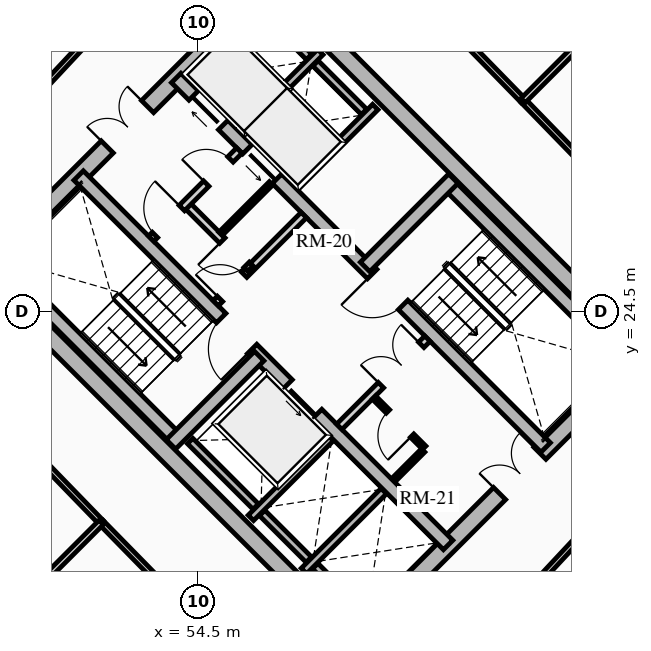
"""IFC4 building model, lengths in metres.
Left out: names, types, materials, properties, quantities, classifications, styles, units other than length and angle.
Written with IfcOpenShell. Run it as: python <this file> out.ifc"""

import sys

from ifc_helpers import new_model, si_unit, direction, frame, frame_2d, origin, place, context, subcontext, project, spatial, rectangle, extrude, source, transform, mapped, element, fill, save


model = new_model("IFC4")
c1 = context("Model", 3, precision=1e-05, world=origin(), true_north=direction((0.0, 1.0)))
c2 = subcontext(c1, "Body", "Model", "MODEL_VIEW")
j1 = project(units=[si_unit("LENGTHUNIT", "METRE"), si_unit("PLANEANGLEUNIT", "RADIAN")], contexts=[c1])
p1 = place(None, origin())
s1 = spatial("IfcSite", under=j1, at=p1, CompositionType="ELEMENT")
p2 = place(p1, origin())
s2 = spatial("IfcBuilding", under=s1, at=p2, CompositionType="ELEMENT")
p3 = place(p2, frame((0.0, 0.0, 93.43)))
s3 = spatial("IfcBuildingStorey", under=s2, at=p3, CompositionType="ELEMENT", Elevation=93.43)
for number, where, z_axis, x_axis in (
    (1, (58.737, 15.697, 0.0), (0.0, 0.0, 1.0), (-0.707, 0.707, 0.0)),
    (2, (66.303, 23.263, 0.0), (0.0, 0.0, 1.0), (-0.707, 0.707, 0.0)),
):
    element("IfcWall", number, at=place(p3, frame(where, z_axis=z_axis, x_axis=x_axis)), inside=s3, PredefinedType="SHEAR", context=c2, shape_type="SweptSolid", body=[
        extrude(rectangle(XDim=14.2, YDim=0.45, at=frame_2d((7.1, 0.0))), origin(), (0.0, 0.0, 1.0), 2.91),
    ])
p4 = place(p3, frame((58.578, 15.856, 0.0), z_axis=(0.0, 0.0, 1.0), x_axis=(0.707106781187, 0.707106781187, 0.0)))
e3 = element("IfcWall", 3, at=p4, inside=s3, PredefinedType="SHEAR", context=c2, shape_type="SweptSolid", body=[
    extrude(rectangle(XDim=10.7, YDim=0.45, at=frame_2d((5.35, 0.0))), origin(), (0.0, 0.0, 1.0), 2.91),
])
m1 = source(origin(), c2, "Body", "SweptSolid", [
    extrude(rectangle(XDim=1.5, YDim=2.02, at=frame_2d((0.75, 1.01))), frame((0.0, 0.235, 0.0), z_axis=(0.0, -1.0, 0.0), x_axis=(1.0, 0.0, 0.0)), (0.0, 0.0, 1.0), 0.47),
])
p5 = place(p4, frame((5.45, 0.0, 0.0)))
e4 = element("IfcOpeningElement", 4, at=p5, cuts=e3, PredefinedType="OPENING", context=c2, shape_type="MappedRepresentation", body=[
    mapped(m1, transform((0.0, 0.0, 0.0), x_axis=(1.0, 0.0, 0.0), y_axis=(0.0, 1.0, 0.0), z_axis=(0.0, 0.0, 1.0), scale=1.0)),
])
p6 = place(p3, frame((48.856, 25.578, 0.0), z_axis=(0.0, 0.0, 1.0), x_axis=(0.707106781187, 0.707106781187, 0.0)))
e5 = element("IfcWall", 5, at=p6, inside=s3, PredefinedType="SHEAR", context=c2, shape_type="SweptSolid", body=[
    extrude(rectangle(XDim=10.7, YDim=0.45, at=frame_2d((5.35, 0.0))), origin(), (0.0, 0.0, 1.0), 2.91),
])
p7 = place(p6, frame((4.6, 0.0, 0.0)))
e6 = element("IfcOpeningElement", 6, at=p7, cuts=e5, PredefinedType="OPENING", context=c2, shape_type="MappedRepresentation", body=[
    mapped(m1, transform((0.0, 0.0, 0.0), x_axis=(1.0, 0.0, 0.0), y_axis=(0.0, 1.0, 0.0), z_axis=(0.0, 0.0, 1.0), scale=1.0)),
])
p8 = place(p3, frame((61.078, 18.355, 0.0), z_axis=(0.0, 0.0, 1.0), x_axis=(-0.707106781187, 0.707106781187, 0.0)))
e7 = element("IfcWall", 7, at=p8, inside=s3, PredefinedType="SHEAR", context=c2, shape_type="SweptSolid", body=[
    extrude(rectangle(XDim=13.75, YDim=0.35, at=frame_2d((6.875, 0.0))), origin(), (0.0, 0.0, 1.0), 2.91),
])
m2 = source(origin(), c2, "Body", "SweptSolid", [
    extrude(rectangle(XDim=1.1, YDim=2.015, at=frame_2d((0.55, 1.007))), frame((0.0, 0.185, 0.0), z_axis=(0.0, -1.0, 0.0), x_axis=(1.0, 0.0, 0.0)), (0.0, 0.0, 1.0), 0.37),
])
p9 = place(p8, frame((4.875, 0.0, 0.0)))
e8 = element("IfcOpeningElement", 8, at=p9, cuts=e7, PredefinedType="OPENING", context=c2, shape_type="MappedRepresentation", body=[
    mapped(m2, transform((0.0, 0.0, 0.0), x_axis=(1.0, 0.0, 0.0), y_axis=(0.0, 1.0, 0.0), z_axis=(0.0, 0.0, 1.0), scale=1.0)),
])
m3 = source(origin(), c2, "Body", "SweptSolid", [
    extrude(rectangle(XDim=1.15, YDim=2.02, at=frame_2d((0.575, 1.01))), frame((0.0, 0.185, 0.0), z_axis=(0.0, -1.0, 0.0), x_axis=(1.0, 0.0, 0.0)), (0.0, 0.0, 1.0), 0.37),
])
p10 = place(p8, frame((7.295, 0.0, 0.0)))
e9 = element("IfcOpeningElement", 9, at=p10, cuts=e7, PredefinedType="OPENING", context=c2, shape_type="MappedRepresentation", body=[
    mapped(m3, transform((0.0, 0.0, 0.0), x_axis=(1.0, 0.0, 0.0), y_axis=(0.0, 1.0, 0.0), z_axis=(0.0, 0.0, 1.0), scale=1.0)),
])
p11 = place(p3, frame((63.645, 20.922, 0.0), z_axis=(0.0, 0.0, 1.0), x_axis=(-0.707106781187, 0.707106781187, 0.0)))
e10 = element("IfcWall", 10, at=p11, inside=s3, PredefinedType="SHEAR", context=c2, shape_type="SweptSolid", body=[
    extrude(rectangle(XDim=13.75, YDim=0.35, at=frame_2d((6.875, 0.0))), origin(), (0.0, 0.0, 1.0), 2.91),
])
p12 = place(p11, frame((10.0, 0.0, 0.0)))
e11 = element("IfcOpeningElement", 11, at=p12, cuts=e10, PredefinedType="OPENING", context=c2, shape_type="MappedRepresentation", body=[
    mapped(m2, transform((0.0, 0.0, 0.0), x_axis=(1.0, 0.0, 0.0), y_axis=(0.0, 1.0, 0.0), z_axis=(0.0, 0.0, 1.0), scale=1.0)),
])
p13 = place(p11, frame((12.0, 0.0, 0.0)))
e12 = element("IfcOpeningElement", 12, at=p13, cuts=e10, PredefinedType="OPENING", context=c2, shape_type="MappedRepresentation", body=[
    mapped(m2, transform((0.0, 0.0, 0.0), x_axis=(1.0, 0.0, 0.0), y_axis=(0.0, 1.0, 0.0), z_axis=(0.0, 0.0, 1.0), scale=1.0)),
])
p14 = place(p11, frame((5.305, 0.0, 0.0)))
e13 = element("IfcOpeningElement", 13, at=p14, cuts=e10, PredefinedType="OPENING", context=c2, shape_type="MappedRepresentation", body=[
    mapped(m3, transform((0.0, 0.0, 0.0), x_axis=(1.0, 0.0, 0.0), y_axis=(0.0, 1.0, 0.0), z_axis=(0.0, 0.0, 1.0), scale=1.0)),
])
p15 = place(p3, frame((53.922, 21.141, 0.0), z_axis=(0.0, 0.0, 1.0), x_axis=(-0.707088616009, 0.707124945897, 0.0)))
e14 = element("IfcWall", 14, at=p15, inside=s3, PredefinedType="SHEAR", context=c2, shape_type="SweptSolid", body=[
    extrude(rectangle(XDim=6.72, YDim=0.35, at=frame_2d((3.36, 0.0))), origin(), (0.0, 0.0, 1.0), 2.91),
])
p16 = place(p3, frame((53.784, 21.003, 0.0), z_axis=(0.0, 0.0, 1.0), x_axis=(0.707106781187, 0.707106781187, 0.0)))
e15 = element("IfcWall", 15, at=p16, inside=s3, PredefinedType="SHEAR", context=c2, shape_type="SweptSolid", body=[
    extrude(rectangle(XDim=3.285, YDim=0.35, at=frame_2d((1.643, 0.0))), origin(), (0.0, 0.0, 1.0), 2.91),
])
p17 = place(p3, frame((65.83, 23.107, 0.0), z_axis=(0.0, 0.0, 1.0), x_axis=(-0.707088616009, 0.707124945897, 0.0)))
e16 = element("IfcWall", 16, at=p17, inside=s3, PredefinedType="SHEAR", context=c2, shape_type="SweptSolid", body=[
    extrude(rectangle(XDim=6.72, YDim=0.35, at=frame_2d((3.36, 0.0))), origin(), (0.0, 0.0, 1.0), 2.91),
])
p18 = place(p3, frame((58.893, 25.674, 0.0), z_axis=(0.0, 0.0, 1.0), x_axis=(0.707106781187, 0.707106781187, 0.0)))
e17 = element("IfcWall", 17, at=p18, inside=s3, PredefinedType="SHEAR", context=c2, shape_type="SweptSolid", body=[
    extrude(rectangle(XDim=3.285, YDim=0.35, at=frame_2d((1.643, 0.0))), origin(), (0.0, 0.0, 1.0), 2.91),
])
p19 = place(p3, frame((55.888, 19.069, 0.0), z_axis=(0.0, 0.0, 1.0), x_axis=(0.707106781187, 0.707106781187, 0.0)))
e18 = element("IfcWall", 18, at=p19, inside=s3, PredefinedType="SHEAR", context=c2, shape_type="SweptSolid", body=[
    extrude(rectangle(XDim=2.97, YDim=0.2, at=frame_2d((1.485, 0.0))), origin(), (0.0, 0.0, 1.0), 2.91),
])
p20 = place(p3, frame((56.015, 19.366, 0.0), z_axis=(0.0, 0.0, 1.0), x_axis=(-0.707106781187, 0.707106781187, 0.0)))
e19 = element("IfcWall", 19, at=p20, inside=s3, PredefinedType="SHEAR", context=c2, shape_type="SweptSolid", body=[
    extrude(rectangle(XDim=2.44, YDim=0.2, at=frame_2d((1.22, 0.0))), origin(), (0.0, 0.0, 1.0), 2.91),
])
p21 = place(p3, frame((57.284, 17.673, 0.0), z_axis=(0.0, 0.0, 1.0), x_axis=(0.707147878904, 0.70706568108, 0.0)))
e20 = element("IfcWall", 20, at=p21, inside=s3, PredefinedType="SHEAR", context=c2, shape_type="SweptSolid", body=[
    extrude(rectangle(XDim=2.97, YDim=0.2, at=frame_2d((1.485, 0.0))), origin(), (0.0, 0.0, 1.0), 2.91),
])
p22 = place(p3, frame((57.412, 17.97, 0.0), z_axis=(0.0, 0.0, 1.0), x_axis=(-0.707106781187, 0.707106781187, 0.0)))
e21 = element("IfcWall", 21, at=p22, inside=s3, PredefinedType="SHEAR", context=c2, shape_type="SweptSolid", body=[
    extrude(rectangle(XDim=1.735, YDim=0.2, at=frame_2d((0.867, 0.0))), origin(), (0.0, 0.0, 1.0), 2.91),
])
p23 = place(p3, frame((58.737, 16.644, 0.0), z_axis=(0.0, 0.0, 1.0), x_axis=(-0.707032117043, 0.707181437447, 0.0)))
e22 = element("IfcWall", 22, at=p23, inside=s3, PredefinedType="SHEAR", context=c2, shape_type="SweptSolid", body=[
    extrude(rectangle(XDim=1.635, YDim=0.2, at=frame_2d((0.817, 0.0))), origin(), (0.0, 0.0, 1.0), 2.91),
])
p24 = place(p3, frame((57.062, 27.781, 0.0), z_axis=(0.0, 0.0, 1.0), x_axis=(0.707106781187, 0.707106781187, 0.0)))
e23 = element("IfcWall", 23, at=p24, inside=s3, PredefinedType="SHEAR", context=c2, shape_type="SweptSolid", body=[
    extrude(rectangle(XDim=2.97, YDim=0.2, at=frame_2d((1.485, 0.0))), origin(), (0.0, 0.0, 1.0), 2.91),
])
p25 = place(p3, frame((55.615, 29.227, 0.0), z_axis=(0.0, 0.0, 1.0), x_axis=(0.707147878904, 0.70706568108, 0.0)))
e24 = element("IfcWall", 24, at=p25, inside=s3, PredefinedType="SHEAR", context=c2, shape_type="SweptSolid", body=[
    extrude(rectangle(XDim=2.97, YDim=0.2, at=frame_2d((1.485, 0.0))), origin(), (0.0, 0.0, 1.0), 2.91),
])
p26 = place(p3, frame((58.865, 29.754, 0.0), z_axis=(0.0, 0.0, 1.0), x_axis=(-0.707174411312, 0.707039144592, 0.0)))
e25 = element("IfcWall", 25, at=p26, inside=s3, PredefinedType="SHEAR", context=c2, shape_type="SweptSolid", body=[
    extrude(rectangle(XDim=1.805, YDim=0.2, at=frame_2d((0.902, 0.0))), origin(), (0.0, 0.0, 1.0), 2.91),
])
p27 = place(p3, frame((57.419, 31.2, 0.0), z_axis=(0.0, 0.0, 1.0), x_axis=(-0.707032117043, 0.707181437447, 0.0)))
e26 = element("IfcWall", 26, at=p27, inside=s3, PredefinedType="SHEAR", context=c2, shape_type="SweptSolid", body=[
    extrude(rectangle(XDim=1.635, YDim=0.2, at=frame_2d((0.817, 0.0))), origin(), (0.0, 0.0, 1.0), 2.91),
])
p28 = place(p3, frame((58.214, 21.467, 0.0), z_axis=(0.0, 0.0, 1.0), x_axis=(0.707106781187, 0.707106781187, 0.0)))
e27 = element("IfcWall", 27, at=p28, inside=s3, PredefinedType="PARTITIONING", context=c2, shape_type="SweptSolid", body=[
    extrude(rectangle(XDim=3.28, YDim=0.2, at=frame_2d((1.64, 0.0))), origin(), (0.0, 0.0, 1.0), 2.655),
])
m4 = source(origin(), c2, "Body", "SweptSolid", [
    extrude(rectangle(XDim=1.5, YDim=2.02, at=frame_2d((0.75, 1.01))), frame((0.0, 0.11, 0.0), z_axis=(0.0, -1.0, 0.0), x_axis=(1.0, 0.0, 0.0)), (0.0, 0.0, 1.0), 0.22),
])
p29 = place(p28, frame((1.55, 0.0, 0.0)))
e28 = element("IfcOpeningElement", 28, at=p29, cuts=e27, PredefinedType="OPENING", context=c2, shape_type="MappedRepresentation", body=[
    mapped(m4, transform((0.0, 0.0, 0.0), x_axis=(1.0, 0.0, 0.0), y_axis=(0.0, 1.0, 0.0), z_axis=(0.0, 0.0, 1.0), scale=1.0)),
])
p30 = place(p3, frame((54.961, 24.719, 0.0), z_axis=(0.0, 0.0, 1.0), x_axis=(0.707106781187, 0.707106781187, 0.0)))
e29 = element("IfcWall", 29, at=p30, inside=s3, PredefinedType="PARTITIONING", context=c2, shape_type="SweptSolid", body=[
    extrude(rectangle(XDim=3.28, YDim=0.2, at=frame_2d((1.64, 0.0))), origin(), (0.0, 0.0, 1.0), 2.655),
])
m5 = source(origin(), c2, "Body", "SweptSolid", [
    extrude(rectangle(XDim=0.9, YDim=2.005, at=frame_2d((0.45, 1.002))), frame((0.0, 0.11, 0.0), z_axis=(0.0, -1.0, 0.0), x_axis=(1.0, 0.0, 0.0)), (0.0, 0.0, 1.0), 0.22),
])
p31 = place(p30, frame((0.16, 0.0, 0.0)))
e30 = element("IfcOpeningElement", 30, at=p31, cuts=e29, PredefinedType="OPENING", context=c2, shape_type="MappedRepresentation", body=[
    mapped(m5, transform((0.0, 0.0, 0.0), x_axis=(1.0, 0.0, 0.0), y_axis=(0.0, 1.0, 0.0), z_axis=(0.0, 0.0, 1.0), scale=1.0)),
])
p32 = place(p3, frame((55.874, 25.631, 0.0), z_axis=(0.0, 0.0, 1.0), x_axis=(-0.707157639372, 0.707055919343, 0.0)))
e31 = element("IfcWall", 31, at=p32, inside=s3, PredefinedType="PARTITIONING", context=c2, shape_type="SweptSolid", body=[
    extrude(rectangle(XDim=2.4, YDim=0.2, at=frame_2d((1.2, 0.0))), origin(), (0.0, 0.0, 1.0), 2.655),
])
p33 = place(p32, frame((0.14, 0.0, 0.0)))
e32 = element("IfcOpeningElement", 32, at=p33, cuts=e31, PredefinedType="OPENING", context=c2, shape_type="MappedRepresentation", body=[
    mapped(m5, transform((0.0, 0.0, 0.0), x_axis=(1.0, 0.0, 0.0), y_axis=(0.0, 1.0, 0.0), z_axis=(0.0, 0.0, 1.0), scale=1.0)),
])
p34 = place(p3, frame((53.264, 26.416, 0.0), z_axis=(0.0, 0.0, 1.0), x_axis=(0.707106781187, 0.707106781187, 0.0)))
e33 = element("IfcWall", 33, at=p34, inside=s3, PredefinedType="PARTITIONING", context=c2, shape_type="SweptSolid", body=[
    extrude(rectangle(XDim=3.28, YDim=0.2, at=frame_2d((1.64, 0.0))), origin(), (0.0, 0.0, 1.0), 2.655),
])
m6 = source(origin(), c2, "Body", "SweptSolid", [
    extrude(rectangle(XDim=1.0, YDim=2.015, at=frame_2d((0.5, 1.007))), frame((0.0, 0.11, 0.0), z_axis=(0.0, -1.0, 0.0), x_axis=(1.0, 0.0, 0.0)), (0.0, 0.0, 1.0), 0.22),
])
p35 = place(p34, frame((0.14, 0.0, 0.0)))
e34 = element("IfcOpeningElement", 34, at=p35, cuts=e33, PredefinedType="OPENING", context=c2, shape_type="MappedRepresentation", body=[
    mapped(m6, transform((0.0, 0.0, 0.0), x_axis=(1.0, 0.0, 0.0), y_axis=(0.0, 1.0, 0.0), z_axis=(0.0, 0.0, 1.0), scale=1.0)),
])
p36 = place(p34, frame((2.05, 0.0, 0.0)))
e35 = element("IfcOpeningElement", 35, at=p36, cuts=e33, PredefinedType="OPENING", context=c2, shape_type="MappedRepresentation", body=[
    mapped(m5, transform((0.0, 0.0, 0.0), x_axis=(1.0, 0.0, 0.0), y_axis=(0.0, 1.0, 0.0), z_axis=(0.0, 0.0, 1.0), scale=1.0)),
])
p37 = place(p3, frame((60.448, 20.915, 0.0), z_axis=(0.0, 0.0, 1.0), x_axis=(-0.707106781187, 0.707106781187, 0.0)))
e36 = element("IfcWall", 36, at=p37, inside=s3, PredefinedType="PARTITIONING", context=c2, shape_type="SweptSolid", body=[
    extrude(rectangle(XDim=1.87, YDim=0.125, at=frame_2d((0.935, 0.0))), origin(), (0.0, 0.0, 1.0), 2.655),
])
m7 = source(origin(), c2, "Body", "SweptSolid", [
    extrude(rectangle(XDim=0.9, YDim=2.005, at=frame_2d((0.45, 1.002))), frame((0.0, 0.073, 0.0), z_axis=(0.0, -1.0, 0.0), x_axis=(1.0, 0.0, 0.0)), (0.0, 0.0, 1.0), 0.145),
])
p38 = place(p37, frame((0.45, 0.0, 0.0)))
e37 = element("IfcOpeningElement", 37, at=p38, cuts=e36, PredefinedType="OPENING", context=c2, shape_type="MappedRepresentation", body=[
    mapped(m7, transform((0.0, 0.0, 0.0), x_axis=(1.0, 0.0, 0.0), y_axis=(0.0, 1.0, 0.0), z_axis=(0.0, 0.0, 1.0), scale=1.0)),
])
p39 = place(p3, frame((59.643, 20.066, 0.0), z_axis=(0.0, 0.0, 1.0), x_axis=(0.707106781187, 0.707106781187, 0.0)))
e38 = element("IfcWall", 38, at=p39, inside=s3, PredefinedType="PARTITIONING", context=c2, shape_type="SweptSolid", body=[
    extrude(rectangle(XDim=1.1, YDim=0.125, at=frame_2d((0.55, 0.0))), origin(), (0.0, 0.0, 1.0), 2.655),
])
p40 = place(p3, frame((55.089, 26.543, 0.0), z_axis=(0.0, 0.0, 1.0), x_axis=(0.707106781187, 0.707106781187, 0.0)))
e39 = element("IfcWall", 39, at=p40, inside=s3, PredefinedType="PARTITIONING", context=c2, shape_type="SweptSolid", body=[
    extrude(rectangle(XDim=1.88, YDim=0.125, at=frame_2d((0.94, 0.0))), origin(), (0.0, 0.0, 1.0), 2.655),
])
p41 = place(p3, frame((63.051, 30.051, 0.0), z_axis=(0.0, 0.0, 1.0), x_axis=(-0.698846622234, 0.715271555839, 0.0)))
e40 = element("IfcWall", 40, at=p41, inside=s3, PredefinedType="PARTITIONING", context=c2, shape_type="SweptSolid", body=[
    extrude(rectangle(XDim=6.05, YDim=0.15, at=frame_2d((3.025, 0.0))), origin(), (0.0, 0.0, 1.0), 2.225),
])
p42 = place(p3, frame((52.107, 32.202, 0.0), z_axis=(0.0, 0.0, 1.0), x_axis=(-0.682605209028, -0.730787334734, 0.0)))
e41 = element("IfcWall", 41, at=p42, inside=s3, PredefinedType="PARTITIONING", context=c2, shape_type="SweptSolid", body=[
    extrude(rectangle(XDim=6.486, YDim=0.15, at=frame_2d((3.243, 0.0))), origin(), (0.0, 0.0, 1.0), 2.225),
])
p43 = place(p3, frame((47.786, 23.242, 0.0), z_axis=(0.0, 0.0, 1.0), x_axis=(0.696183456981, -0.717863910659, 0.0)))
e42 = element("IfcWall", 42, at=p43, inside=s3, PredefinedType="PARTITIONING", context=c2, shape_type="SweptSolid", body=[
    extrude(rectangle(XDim=5.979, YDim=0.15, at=frame_2d((2.99, 0.0))), origin(), (0.0, 0.0, 1.0), 2.655),
])
p44 = place(p3, frame((51.949, 18.949, 0.0), z_axis=(0.0, 0.0, 1.0), x_axis=(0.699801520154, -0.714337337951, 0.0)))
e43 = element("IfcWall", 43, at=p44, inside=s3, PredefinedType="PARTITIONING", context=c2, shape_type="SweptSolid", body=[
    extrude(rectangle(XDim=6.097, YDim=0.15, at=frame_2d((3.048, 0.0))), origin(), (0.0, 0.0, 1.0), 2.225),
])
p45 = place(p3, frame((62.839, 16.745, 0.0), z_axis=(0.0, 0.0, 1.0), x_axis=(0.682386779427, 0.73099130177, 0.0)))
e44 = element("IfcWall", 44, at=p45, inside=s3, PredefinedType="PARTITIONING", context=c2, shape_type="SweptSolid", body=[
    extrude(rectangle(XDim=6.6, YDim=0.15, at=frame_2d((3.3, 0.0))), origin(), (0.0, 0.0, 1.0), 2.225),
])
p46 = place(p3, frame((67.19, 25.791, 0.0), z_axis=(0.0, 0.0, 1.0), x_axis=(-0.696839457851, 0.717227139742, 0.0)))
e45 = element("IfcWall", 45, at=p46, inside=s3, PredefinedType="PARTITIONING", context=c2, shape_type="SweptSolid", body=[
    extrude(rectangle(XDim=5.939, YDim=0.15, at=frame_2d((2.97, 0.0))), origin(), (0.0, 0.0, 1.0), 2.655),
])
for number, where, z_axis, x_axis in (
    (46, (63.051, 30.051, 0.0), (0.0, 0.0, 1.0), (0.707, 0.707, 0.0)),
    (47, (51.949, 18.949, 0.0), (0.0, 0.0, 1.0), (-0.707, -0.707, 0.0)),
):
    element("IfcWall", number, at=place(p3, frame(where, z_axis=z_axis, x_axis=x_axis)), inside=s3, PredefinedType="PARTITIONING", context=c2, shape_type="SweptSolid", body=[
        extrude(rectangle(XDim=7.711, YDim=0.16, at=frame_2d((3.855, 0.0))), origin(), (0.0, 0.0, 1.0), 2.179),
    ])
m8 = source(origin(), c2, "Body", "SweptSolid", [
    extrude(rectangle(XDim=1.1, YDim=2.015, at=frame_2d((0.55, 1.007))), frame((0.0, 0.025, 0.0), z_axis=(0.0, -1.0, 0.0), x_axis=(1.0, 0.0, 0.0)), (0.0, 0.0, 1.0), 0.05),
])
p47 = place(p9, origin())
e48 = element("IfcDoor", 48, at=p47, inside=s3, OperationType="SLIDING_TO_LEFT", PredefinedType="DOOR", context=c2, shape_type="MappedRepresentation", body=[
    mapped(m8, transform((0.0, 0.0, 0.0), x_axis=(1.0, 0.0, 0.0), y_axis=(0.0, 1.0, 0.0), z_axis=(0.0, 0.0, 1.0), scale=1.0)),
])
fill(e8, e48)
p48 = place(p12, origin())
e49 = element("IfcDoor", 49, at=p48, inside=s3, OperationType="SLIDING_TO_LEFT", PredefinedType="DOOR", context=c2, shape_type="MappedRepresentation", body=[
    mapped(m8, transform((0.0, 0.0, 0.0), x_axis=(1.0, 0.0, 0.0), y_axis=(0.0, 1.0, 0.0), z_axis=(0.0, 0.0, 1.0), scale=1.0)),
])
fill(e11, e49)
p49 = place(p13, origin())
e50 = element("IfcDoor", 50, at=p49, inside=s3, OperationType="SLIDING_TO_RIGHT", PredefinedType="DOOR", context=c2, shape_type="MappedRepresentation", body=[
    mapped(m8, transform((0.0, 0.0, 0.0), x_axis=(1.0, 0.0, 0.0), y_axis=(0.0, 1.0, 0.0), z_axis=(0.0, 0.0, 1.0), scale=1.0)),
])
fill(e12, e50)
m9 = source(origin(), c2, "Body", "SweptSolid", [
    extrude(rectangle(XDim=1.15, YDim=2.02, at=frame_2d((0.575, 1.01))), frame((0.0, 0.025, 0.0), z_axis=(0.0, -1.0, 0.0), x_axis=(1.0, 0.0, 0.0)), (0.0, 0.0, 1.0), 0.05),
])
p50 = place(p10, origin())
e51 = element("IfcDoor", 51, at=p50, inside=s3, OperationType="SINGLE_SWING_LEFT", PredefinedType="DOOR", context=c2, shape_type="MappedRepresentation", body=[
    mapped(m9, transform((0.0, 0.0, 0.0), x_axis=(1.0, 0.0, 0.0), y_axis=(0.0, 1.0, 0.0), z_axis=(0.0, 0.0, 1.0), scale=1.0)),
])
fill(e9, e51)
p51 = place(p14, origin())
e52 = element("IfcDoor", 52, at=p51, inside=s3, OperationType="SINGLE_SWING_RIGHT", PredefinedType="DOOR", context=c2, shape_type="MappedRepresentation", body=[
    mapped(m9, transform((0.0, 0.0, 0.0), x_axis=(1.0, 0.0, 0.0), y_axis=(0.0, 1.0, 0.0), z_axis=(0.0, 0.0, 1.0), scale=1.0)),
])
fill(e13, e52)
m10 = source(origin(), c2, "Body", "SweptSolid", [
    extrude(rectangle(XDim=1.5, YDim=2.02, at=frame_2d((0.75, 1.01))), frame((0.0, 0.025, 0.0), z_axis=(0.0, -1.0, 0.0), x_axis=(1.0, 0.0, 0.0)), (0.0, 0.0, 1.0), 0.05),
])
p52 = place(p7, origin())
e53 = element("IfcDoor", 53, at=p52, inside=s3, OperationType="DOUBLE_DOOR_SINGLE_SWING", PredefinedType="DOOR", context=c2, shape_type="MappedRepresentation", body=[
    mapped(m10, transform((0.0, 0.0, 0.0), x_axis=(1.0, 0.0, 0.0), y_axis=(0.0, 1.0, 0.0), z_axis=(0.0, 0.0, 1.0), scale=1.0)),
])
fill(e6, e53)
p53 = place(p5, origin())
e54 = element("IfcDoor", 54, at=p53, inside=s3, OperationType="DOUBLE_DOOR_SINGLE_SWING", PredefinedType="DOOR", context=c2, shape_type="MappedRepresentation", body=[
    mapped(m10, transform((0.0, 0.0, 0.0), x_axis=(1.0, 0.0, 0.0), y_axis=(0.0, 1.0, 0.0), z_axis=(0.0, 0.0, 1.0), scale=1.0)),
])
fill(e4, e54)
p54 = place(p29, origin())
e55 = element("IfcDoor", 55, at=p54, inside=s3, OperationType="DOUBLE_DOOR_SINGLE_SWING", PredefinedType="DOOR", context=c2, shape_type="MappedRepresentation", body=[
    mapped(m10, transform((0.0, 0.0, 0.0), x_axis=(1.0, 0.0, 0.0), y_axis=(0.0, 1.0, 0.0), z_axis=(0.0, 0.0, 1.0), scale=1.0)),
])
fill(e28, e55)
m11 = source(origin(), c2, "Body", "SweptSolid", [
    extrude(rectangle(XDim=0.9, YDim=2.005, at=frame_2d((0.45, 1.002))), frame((0.0, 0.025, 0.0), z_axis=(0.0, -1.0, 0.0), x_axis=(1.0, 0.0, 0.0)), (0.0, 0.0, 1.0), 0.05),
])
p55 = place(p31, origin())
e56 = element("IfcDoor", 56, at=p55, inside=s3, OperationType="SINGLE_SWING_LEFT", PredefinedType="DOOR", context=c2, shape_type="MappedRepresentation", body=[
    mapped(m11, transform((0.0, 0.0, 0.0), x_axis=(1.0, 0.0, 0.0), y_axis=(0.0, 1.0, 0.0), z_axis=(0.0, 0.0, 1.0), scale=1.0)),
])
fill(e30, e56)
m12 = source(origin(), c2, "Body", "SweptSolid", [
    extrude(rectangle(XDim=1.0, YDim=2.015, at=frame_2d((0.5, 1.007))), frame((0.0, 0.025, 0.0), z_axis=(0.0, -1.0, 0.0), x_axis=(1.0, 0.0, 0.0)), (0.0, 0.0, 1.0), 0.05),
])
p56 = place(p35, origin())
e57 = element("IfcDoor", 57, at=p56, inside=s3, OperationType="SINGLE_SWING_RIGHT", PredefinedType="DOOR", context=c2, shape_type="MappedRepresentation", body=[
    mapped(m12, transform((0.0, 0.0, 0.0), x_axis=(1.0, 0.0, 0.0), y_axis=(0.0, 1.0, 0.0), z_axis=(0.0, 0.0, 1.0), scale=1.0)),
])
fill(e34, e57)
p57 = place(p38, origin())
e58 = element("IfcDoor", 58, at=p57, inside=s3, OperationType="SINGLE_SWING_LEFT", PredefinedType="DOOR", context=c2, shape_type="MappedRepresentation", body=[
    mapped(m11, transform((0.0, 0.0, 0.0), x_axis=(1.0, 0.0, 0.0), y_axis=(0.0, 1.0, 0.0), z_axis=(0.0, 0.0, 1.0), scale=1.0)),
])
fill(e37, e58)
p58 = place(p33, origin())
e59 = element("IfcDoor", 59, at=p58, inside=s3, OperationType="SINGLE_SWING_RIGHT", PredefinedType="DOOR", context=c2, shape_type="MappedRepresentation", body=[
    mapped(m11, transform((0.0, 0.0, 0.0), x_axis=(1.0, 0.0, 0.0), y_axis=(0.0, 1.0, 0.0), z_axis=(0.0, 0.0, 1.0), scale=1.0)),
])
fill(e32, e59)
p59 = place(p36, origin())
e60 = element("IfcDoor", 60, at=p59, inside=s3, OperationType="SINGLE_SWING_LEFT", PredefinedType="DOOR", context=c2, shape_type="MappedRepresentation", body=[
    mapped(m11, transform((0.0, 0.0, 0.0), x_axis=(1.0, 0.0, 0.0), y_axis=(0.0, 1.0, 0.0), z_axis=(0.0, 0.0, 1.0), scale=1.0)),
])
fill(e35, e60)
save(model, sys.argv[1])
